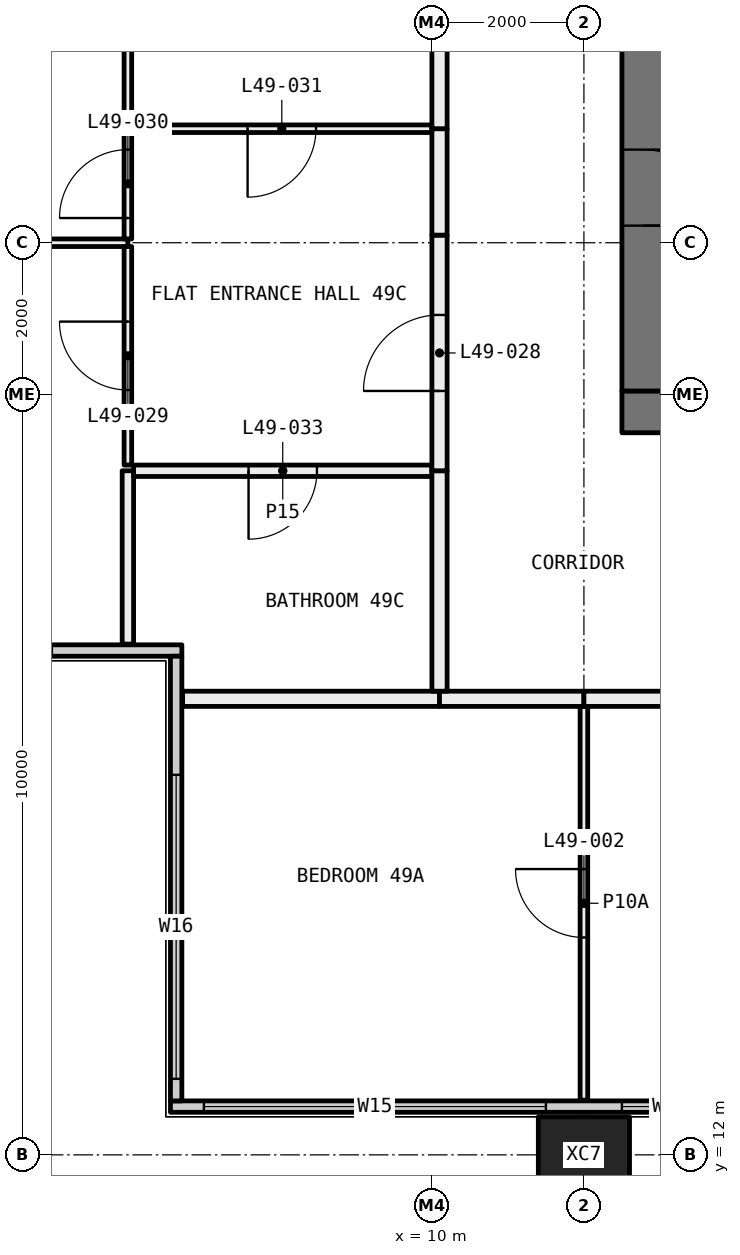
"""IFC4 building model, lengths in metres.
Left out: names, types, materials, properties, quantities, classifications, styles, units other than length and angle.
Written with IfcOpenShell. Run it as: python <this file> out.ifc"""

import sys

from ifc_helpers import new_model, si_unit, direction, frame, frame_2d, origin, origin_2d, place, context, subcontext, project, spatial, rectangle, hollow_rectangle, extrude, element, fill, save


model = new_model("IFC4")
c1 = context("Model", 3, precision=1e-05, world=origin(), true_north=direction((0.0, 1.0)))
c2 = subcontext(c1, "Body", "Model", "MODEL_VIEW")
j1 = project(units=[si_unit("LENGTHUNIT", "METRE"), si_unit("PLANEANGLEUNIT", "RADIAN")], contexts=[c1])
p1 = place(None, origin())
s1 = spatial("IfcSite", under=j1, at=p1, CompositionType="ELEMENT")
p2 = place(p1, origin())
s2 = spatial("IfcBuilding", under=s1, at=p2, CompositionType="ELEMENT")
p3 = place(p2, frame((0.0, 0.0, 185.85)))
s3 = spatial("IfcBuildingStorey", under=s2, at=p3, CompositionType="ELEMENT", Elevation=185.85)
p4 = place(p3, frame((12.0, 12.0, -0.4), z_axis=(0.0, 0.0, 1.0), x_axis=(1.0, 0.0, 0.0)))
e1 = element("IfcColumn", 1, at=p4, inside=s3, PredefinedType="COLUMN", context=c2, shape_type="SweptSolid", body=[
    extrude(hollow_rectangle(XDim=1.2, YDim=1.0, WallThickness=0.045, at=origin_2d()), origin(), (0.0, 0.0, 1.0), 3.45),
])
p5 = place(p3, frame((6.56, 12.635, 0.0), z_axis=(0.0, 0.0, 1.0), x_axis=(1.0, 0.0, 0.0)))
e2 = element("IfcWall", 2, at=p5, inside=s3, PredefinedType="ELEMENTEDWALL", context=c2, shape_type="SweptSolid", body=[
    extrude(rectangle(XDim=46.88, YDim=0.15, at=frame_2d((23.44, 0.0))), origin(), (0.0, 0.0, 1.0), 3.05),
])
p6 = place(p5, frame((0.44, 0.0, 0.45)))
e3 = element("IfcOpeningElement", 3, at=p6, cuts=e2, PredefinedType="OPENING", context=c2, shape_type="SweptSolid", body=[
    extrude(rectangle(XDim=4.5, YDim=2.55, at=frame_2d((2.25, 1.275))), frame((0.0, 0.085, 0.0), z_axis=(0.0, -1.0, 0.0), x_axis=(1.0, 0.0, 0.0)), (0.0, 0.0, 1.0), 0.17),
])
p7 = place(p5, frame((5.94, 0.0, 0.45)))
e4 = element("IfcOpeningElement", 4, at=p7, cuts=e2, PredefinedType="OPENING", context=c2, shape_type="SweptSolid", body=[
    extrude(rectangle(XDim=1.25, YDim=2.55, at=frame_2d((0.625, 1.275))), frame((0.0, 0.085, 0.0), z_axis=(0.0, -1.0, 0.0), x_axis=(1.0, 0.0, 0.0)), (0.0, 0.0, 1.0), 0.17),
])
p8 = place(p5, frame((10.19, 0.0, 0.45)))
e5 = element("IfcOpeningElement", 5, at=p8, cuts=e2, PredefinedType="OPENING", context=c2, shape_type="SweptSolid", body=[
    extrude(rectangle(XDim=0.75, YDim=2.55, at=frame_2d((0.375, 1.275))), frame((0.0, 0.085, 0.0), z_axis=(0.0, -1.0, 0.0), x_axis=(1.0, 0.0, 0.0)), (0.0, 0.0, 1.0), 0.17),
])
p9 = place(p5, frame((11.94, 0.0, 0.45)))
e6 = element("IfcOpeningElement", 6, at=p9, cuts=e2, PredefinedType="OPENING", context=c2, shape_type="SweptSolid", body=[
    extrude(rectangle(XDim=0.75, YDim=2.55, at=frame_2d((0.375, 1.275))), frame((0.0, 0.085, 0.0), z_axis=(0.0, -1.0, 0.0), x_axis=(1.0, 0.0, 0.0)), (0.0, 0.0, 1.0), 0.17),
])
p10 = place(p5, frame((15.69, 0.0, 0.45)))
e7 = element("IfcOpeningElement", 7, at=p10, cuts=e2, PredefinedType="OPENING", context=c2, shape_type="SweptSolid", body=[
    extrude(rectangle(XDim=1.25, YDim=2.55, at=frame_2d((0.625, 1.275))), frame((0.0, 0.085, 0.0), z_axis=(0.0, -1.0, 0.0), x_axis=(1.0, 0.0, 0.0)), (0.0, 0.0, 1.0), 0.17),
])
p11 = place(p5, frame((17.94, 0.0, 0.45)))
e8 = element("IfcOpeningElement", 8, at=p11, cuts=e2, PredefinedType="OPENING", context=c2, shape_type="SweptSolid", body=[
    extrude(rectangle(XDim=1.25, YDim=2.55, at=frame_2d((0.625, 1.275))), frame((0.0, 0.085, 0.0), z_axis=(0.0, -1.0, 0.0), x_axis=(1.0, 0.0, 0.0)), (0.0, 0.0, 1.0), 0.17),
])
p12 = place(p5, frame((22.19, 0.0, 0.45)))
e9 = element("IfcOpeningElement", 9, at=p12, cuts=e2, PredefinedType="OPENING", context=c2, shape_type="SweptSolid", body=[
    extrude(rectangle(XDim=0.75, YDim=2.55, at=frame_2d((0.375, 1.275))), frame((0.0, 0.085, 0.0), z_axis=(0.0, -1.0, 0.0), x_axis=(1.0, 0.0, 0.0)), (0.0, 0.0, 1.0), 0.17),
])
p13 = place(p5, frame((23.94, 0.0, 0.45)))
e10 = element("IfcOpeningElement", 10, at=p13, cuts=e2, PredefinedType="OPENING", context=c2, shape_type="SweptSolid", body=[
    extrude(rectangle(XDim=0.75, YDim=2.55, at=frame_2d((0.375, 1.275))), frame((0.0, 0.085, 0.0), z_axis=(0.0, -1.0, 0.0), x_axis=(1.0, 0.0, 0.0)), (0.0, 0.0, 1.0), 0.17),
])
p14 = place(p5, frame((27.69, 0.0, 0.45)))
e11 = element("IfcOpeningElement", 11, at=p14, cuts=e2, PredefinedType="OPENING", context=c2, shape_type="SweptSolid", body=[
    extrude(rectangle(XDim=1.25, YDim=2.55, at=frame_2d((0.625, 1.275))), frame((0.0, 0.085, 0.0), z_axis=(0.0, -1.0, 0.0), x_axis=(1.0, 0.0, 0.0)), (0.0, 0.0, 1.0), 0.17),
])
p15 = place(p5, frame((29.94, 0.0, 0.45)))
e12 = element("IfcOpeningElement", 12, at=p15, cuts=e2, PredefinedType="OPENING", context=c2, shape_type="SweptSolid", body=[
    extrude(rectangle(XDim=1.25, YDim=2.55, at=frame_2d((0.625, 1.275))), frame((0.0, 0.085, 0.0), z_axis=(0.0, -1.0, 0.0), x_axis=(1.0, 0.0, 0.0)), (0.0, 0.0, 1.0), 0.17),
])
p16 = place(p5, frame((34.19, 0.0, 0.45)))
e13 = element("IfcOpeningElement", 13, at=p16, cuts=e2, PredefinedType="OPENING", context=c2, shape_type="SweptSolid", body=[
    extrude(rectangle(XDim=0.75, YDim=2.55, at=frame_2d((0.375, 1.275))), frame((0.0, 0.085, 0.0), z_axis=(0.0, -1.0, 0.0), x_axis=(1.0, 0.0, 0.0)), (0.0, 0.0, 1.0), 0.17),
])
p17 = place(p5, frame((35.94, 0.0, 0.45)))
e14 = element("IfcOpeningElement", 14, at=p17, cuts=e2, PredefinedType="OPENING", context=c2, shape_type="SweptSolid", body=[
    extrude(rectangle(XDim=0.75, YDim=2.55, at=frame_2d((0.375, 1.275))), frame((0.0, 0.085, 0.0), z_axis=(0.0, -1.0, 0.0), x_axis=(1.0, 0.0, 0.0)), (0.0, 0.0, 1.0), 0.17),
])
p18 = place(p5, frame((39.69, 0.0, 0.45)))
e15 = element("IfcOpeningElement", 15, at=p18, cuts=e2, PredefinedType="OPENING", context=c2, shape_type="SweptSolid", body=[
    extrude(rectangle(XDim=1.25, YDim=2.55, at=frame_2d((0.625, 1.275))), frame((0.0, 0.085, 0.0), z_axis=(0.0, -1.0, 0.0), x_axis=(1.0, 0.0, 0.0)), (0.0, 0.0, 1.0), 0.17),
])
p19 = place(p5, frame((41.94, 0.0, 0.45)))
e16 = element("IfcOpeningElement", 16, at=p19, cuts=e2, PredefinedType="OPENING", context=c2, shape_type="SweptSolid", body=[
    extrude(rectangle(XDim=4.5, YDim=2.55, at=frame_2d((2.25, 1.275))), frame((0.0, 0.085, 0.0), z_axis=(0.0, -1.0, 0.0), x_axis=(1.0, 0.0, 0.0)), (0.0, 0.0, 1.0), 0.17),
])
p20 = place(p3, frame((0.56, 18.635, 0.0), z_axis=(0.0, 0.0, 1.0), x_axis=(1.0, 0.0, 0.0)))
e17 = element("IfcWall", 17, at=p20, inside=s3, PredefinedType="ELEMENTEDWALL", context=c2, shape_type="SweptSolid", body=[
    extrude(rectangle(XDim=6.15, YDim=0.15, at=frame_2d((3.075, 0.0))), origin(), (0.0, 0.0, 1.0), 3.05),
])
p21 = place(p20, frame((0.44, 0.0, 0.45)))
e18 = element("IfcOpeningElement", 18, at=p21, cuts=e17, PredefinedType="OPENING", context=c2, shape_type="SweptSolid", body=[
    extrude(rectangle(XDim=4.0, YDim=2.55, at=frame_2d((2.0, 1.275))), frame((0.0, 0.085, 0.0), z_axis=(0.0, -1.0, 0.0), x_axis=(1.0, 0.0, 0.0)), (0.0, 0.0, 1.0), 0.17),
])
p22 = place(p3, frame((6.635, 12.71, 0.0), z_axis=(0.0, 0.0, 1.0), x_axis=(0.0, 1.0, 0.0)))
e19 = element("IfcWall", 19, at=p22, inside=s3, PredefinedType="ELEMENTEDWALL", context=c2, shape_type="SweptSolid", body=[
    extrude(rectangle(XDim=5.85, YDim=0.15, at=frame_2d((2.925, 0.0))), origin(), (0.0, 0.0, 1.0), 3.05),
])
p23 = place(p22, frame((0.29, 0.0, 0.45)))
e20 = element("IfcOpeningElement", 20, at=p23, cuts=e19, PredefinedType="OPENING", context=c2, shape_type="SweptSolid", body=[
    extrude(rectangle(XDim=4.0, YDim=2.55, at=frame_2d((2.0, 1.275))), frame((0.0, 0.085, 0.0), z_axis=(0.0, -1.0, 0.0), x_axis=(1.0, 0.0, 0.0)), (0.0, 0.0, 1.0), 0.17),
])
p24 = place(p3, frame((12.0, 12.72, 0.0), z_axis=(0.0, 0.0, 1.0), x_axis=(0.0, 1.0, 0.0)))
e21 = element("IfcWall", 21, at=p24, inside=s3, PredefinedType="PARTITIONING", context=c2, shape_type="SweptSolid", body=[
    extrude(rectangle(XDim=5.18, YDim=0.1, at=frame_2d((2.59, 0.0))), origin(), (0.0, 0.0, 1.0), 3.05),
])
p25 = place(p24, frame((2.14, 0.0, 0.0)))
e22 = element("IfcOpeningElement", 22, at=p25, cuts=e21, PredefinedType="OPENING", context=c2, shape_type="SweptSolid", body=[
    extrude(rectangle(XDim=0.9, YDim=2.1, at=frame_2d((0.45, 1.05))), frame((0.0, 0.06, 0.0), z_axis=(0.0, -1.0, 0.0), x_axis=(1.0, 0.0, 0.0)), (0.0, 0.0, 1.0), 0.12),
])
p26 = place(p3, frame((10.1, 18.0, 0.0), z_axis=(0.0, 0.0, 1.0), x_axis=(-1.0, 0.0, 0.0)))
e23 = element("IfcWall", 23, at=p26, inside=s3, PredefinedType="PARTITIONING", context=c2, shape_type="SweptSolid", body=[
    extrude(rectangle(XDim=3.38, YDim=0.2, at=frame_2d((1.69, 0.0))), origin(), (0.0, 0.0, 1.0), 3.05),
])
p27 = place(p3, frame((12.0, 18.0, 0.0), z_axis=(0.0, 0.0, 1.0), x_axis=(-1.0, 0.0, 0.0)))
e24 = element("IfcWall", 24, at=p27, inside=s3, PredefinedType="PARTITIONING", context=c2, shape_type="SweptSolid", body=[
    extrude(rectangle(XDim=1.9, YDim=0.2, at=frame_2d((0.95, 0.0))), origin(), (0.0, 0.0, 1.0), 3.05),
])
p28 = place(p3, frame((18.0, 18.0, 0.0), z_axis=(0.0, 0.0, 1.0), x_axis=(-1.0, 0.0, 0.0)))
e25 = element("IfcWall", 25, at=p28, inside=s3, PredefinedType="PARTITIONING", context=c2, shape_type="SweptSolid", body=[
    extrude(rectangle(XDim=6.0, YDim=0.2, at=frame_2d((3.0, 0.0))), origin(), (0.0, 0.0, 1.0), 3.05),
])
p29 = place(p28, frame((2.5, 0.0, 0.0)))
e26 = element("IfcOpeningElement", 26, at=p29, cuts=e25, PredefinedType="OPENING", context=c2, shape_type="SweptSolid", body=[
    extrude(rectangle(XDim=1.0, YDim=2.1, at=frame_2d((0.5, 1.05))), frame((0.0, 0.11, 0.0), z_axis=(0.0, -1.0, 0.0), x_axis=(1.0, 0.0, 0.0)), (0.0, 0.0, 1.0), 0.22),
])
p30 = place(p3, frame((6.0, 24.0, 0.0), z_axis=(0.0, 0.0, 1.0), x_axis=(-1.0, 0.0, 0.0)))
e27 = element("IfcWall", 27, at=p30, inside=s3, PredefinedType="PARTITIONING", context=c2, shape_type="SweptSolid", body=[
    extrude(rectangle(XDim=5.28, YDim=0.1, at=frame_2d((2.64, 0.0))), origin(), (0.0, 0.0, 1.0), 2.45),
])
p31 = place(p3, frame((6.0, 18.72, 0.0), z_axis=(0.0, 0.0, 1.0), x_axis=(0.0, 1.0, 0.0)))
e28 = element("IfcWall", 28, at=p31, inside=s3, PredefinedType="PARTITIONING", context=c2, shape_type="SweptSolid", body=[
    extrude(rectangle(XDim=2.28, YDim=0.15, at=frame_2d((1.14, 0.0))), origin(), (0.0, 0.0, 1.0), 3.05),
])
p32 = place(p3, frame((6.0, 21.075, 0.0), z_axis=(0.0, 0.0, 1.0), x_axis=(0.0, 1.0, 0.0)))
e29 = element("IfcWall", 29, at=p32, inside=s3, PredefinedType="PARTITIONING", context=c2, shape_type="SweptSolid", body=[
    extrude(rectangle(XDim=2.875, YDim=0.1, at=frame_2d((1.438, 0.0))), origin(), (0.0, 0.0, 1.0), 2.45),
])
p33 = place(p32, frame((0.988, 0.0, 0.0)))
e30 = element("IfcOpeningElement", 30, at=p33, cuts=e29, PredefinedType="OPENING", context=c2, shape_type="SweptSolid", body=[
    extrude(rectangle(XDim=0.9, YDim=2.1, at=frame_2d((0.45, 1.05))), frame((0.0, 0.06, 0.0), z_axis=(0.0, -1.0, 0.0), x_axis=(1.0, 0.0, 0.0)), (0.0, 0.0, 1.0), 0.12),
])
p34 = place(p3, frame((6.0, 24.05, 0.0), z_axis=(0.0, 0.0, 1.0), x_axis=(0.0, 1.0, 0.0)))
e31 = element("IfcWall", 31, at=p34, inside=s3, PredefinedType="PARTITIONING", context=c2, shape_type="SweptSolid", body=[
    extrude(rectangle(XDim=1.45, YDim=0.1, at=frame_2d((0.725, 0.0))), origin(), (0.0, 0.0, 1.0), 2.45),
])
p35 = place(p34, frame((0.275, 0.0, 0.0)))
e32 = element("IfcOpeningElement", 32, at=p35, cuts=e31, PredefinedType="OPENING", context=c2, shape_type="SweptSolid", body=[
    extrude(rectangle(XDim=0.9, YDim=2.1, at=frame_2d((0.45, 1.05))), frame((0.0, 0.06, 0.0), z_axis=(0.0, -1.0, 0.0), x_axis=(1.0, 0.0, 0.0)), (0.0, 0.0, 1.0), 0.12),
])
p36 = place(p3, frame((6.0, 25.5, 0.0), z_axis=(0.0, 0.0, 1.0), x_axis=(0.0, 1.0, 0.0)))
e33 = element("IfcWall", 33, at=p36, inside=s3, PredefinedType="PARTITIONING", context=c2, shape_type="SweptSolid", body=[
    extrude(rectangle(XDim=10.45, YDim=0.1, at=frame_2d((5.225, 0.0))), origin(), (0.0, 0.0, 1.0), 2.45),
])
p37 = place(p3, frame((10.0, 21.0, 0.0), z_axis=(0.0, 0.0, 1.0), x_axis=(-1.0, 0.0, 0.0)))
e34 = element("IfcWall", 34, at=p37, inside=s3, PredefinedType="PARTITIONING", context=c2, shape_type="SweptSolid", body=[
    extrude(rectangle(XDim=3.925, YDim=0.15, at=frame_2d((1.962, 0.0))), origin(), (0.0, 0.0, 1.0), 3.05),
])
p38 = place(p37, frame((1.512, 0.0, 0.0)))
e35 = element("IfcOpeningElement", 35, at=p38, cuts=e34, PredefinedType="OPENING", context=c2, shape_type="SweptSolid", body=[
    extrude(rectangle(XDim=0.9, YDim=2.1, at=frame_2d((0.45, 1.05))), frame((0.0, 0.085, 0.0), z_axis=(0.0, -1.0, 0.0), x_axis=(1.0, 0.0, 0.0)), (0.0, 0.0, 1.0), 0.17),
])
p39 = place(p3, frame((10.1, 18.1, 0.0), z_axis=(0.0, 0.0, 1.0), x_axis=(0.0, 1.0, 0.0)))
e36 = element("IfcWall", 36, at=p39, inside=s3, PredefinedType="PARTITIONING", context=c2, shape_type="SweptSolid", body=[
    extrude(rectangle(XDim=2.9, YDim=0.2, at=frame_2d((1.45, 0.0))), origin(), (0.0, 0.0, 1.0), 3.05),
])
p40 = place(p3, frame((10.0, 25.5, 0.0), z_axis=(0.0, 0.0, 1.0), x_axis=(-1.0, 0.0, 0.0)))
e37 = element("IfcWall", 37, at=p40, inside=s3, PredefinedType="PARTITIONING", context=c2, shape_type="SweptSolid", body=[
    extrude(rectangle(XDim=3.95, YDim=0.1, at=frame_2d((1.975, 0.0))), origin(), (0.0, 0.0, 1.0), 3.05),
])
p41 = place(p40, frame((1.525, 0.0, 0.0)))
e38 = element("IfcOpeningElement", 38, at=p41, cuts=e37, PredefinedType="OPENING", context=c2, shape_type="SweptSolid", body=[
    extrude(rectangle(XDim=0.9, YDim=2.1, at=frame_2d((0.45, 1.05))), frame((0.0, 0.06, 0.0), z_axis=(0.0, -1.0, 0.0), x_axis=(1.0, 0.0, 0.0)), (0.0, 0.0, 1.0), 0.12),
])
p42 = place(p3, frame((10.1, 21.0, 0.0), z_axis=(0.0, 0.0, 1.0), x_axis=(0.0, 1.0, 0.0)))
e39 = element("IfcWall", 39, at=p42, inside=s3, PredefinedType="PARTITIONING", context=c2, shape_type="SweptSolid", body=[
    extrude(rectangle(XDim=3.1, YDim=0.2, at=frame_2d((1.55, 0.0))), origin(), (0.0, 0.0, 1.0), 2.45),
])
p43 = place(p42, frame((1.05, 0.0, 0.0)))
e40 = element("IfcOpeningElement", 40, at=p43, cuts=e39, PredefinedType="OPENING", context=c2, shape_type="SweptSolid", body=[
    extrude(rectangle(XDim=1.0, YDim=2.1, at=frame_2d((0.5, 1.05))), frame((0.0, 0.11, 0.0), z_axis=(0.0, -1.0, 0.0), x_axis=(1.0, 0.0, 0.0)), (0.0, 0.0, 1.0), 0.22),
])
p44 = place(p3, frame((10.1, 24.1, 0.0), z_axis=(0.0, 0.0, 1.0), x_axis=(0.0, 1.0, 0.0)))
e41 = element("IfcWall", 41, at=p44, inside=s3, PredefinedType="PARTITIONING", context=c2, shape_type="SweptSolid", body=[
    extrude(rectangle(XDim=1.4, YDim=0.2, at=frame_2d((0.7, 0.0))), origin(), (0.0, 0.0, 1.0), 3.05),
])
p45 = place(p3, frame((10.1, 25.5, 0.0), z_axis=(0.0, 0.0, 1.0), x_axis=(0.0, 1.0, 0.0)))
e42 = element("IfcWall", 42, at=p45, inside=s3, PredefinedType="PARTITIONING", context=c2, shape_type="SweptSolid", body=[
    extrude(rectangle(XDim=10.6, YDim=0.2, at=frame_2d((5.3, 0.0))), origin(), (0.0, 0.0, 1.0), 2.45),
])
p46 = place(p3, frame((12.5, 21.775, 0.0), z_axis=(0.0, 0.0, 1.0), x_axis=(1.0, 0.0, 0.0)))
e43 = element("IfcWall", 43, at=p46, inside=s3, PredefinedType="SHEAR", context=c2, shape_type="SweptSolid", body=[
    extrude(rectangle(XDim=11.0, YDim=0.55, at=frame_2d((5.5, 0.0))), origin(), (0.0, 0.0, 1.0), 3.05),
])
p47 = place(p3, frame((12.775, 22.05, 0.0), z_axis=(0.0, 0.0, 1.0), x_axis=(0.0, 1.0, 0.0)))
e44 = element("IfcWall", 44, at=p47, inside=s3, PredefinedType="SHEAR", context=c2, shape_type="SweptSolid", body=[
    extrude(rectangle(XDim=15.9, YDim=0.55, at=frame_2d((7.95, 0.0))), origin(), (0.0, 0.0, 1.0), 3.05),
])
p48 = place(p47, frame((8.4, 0.0, 0.0)))
e45 = element("IfcOpeningElement", 45, at=p48, cuts=e44, PredefinedType="OPENING", context=c2, shape_type="SweptSolid", body=[
    extrude(rectangle(XDim=1.6, YDim=2.1, at=frame_2d((0.8, 1.05))), frame((0.0, 0.285, 0.0), z_axis=(0.0, -1.0, 0.0), x_axis=(1.0, 0.0, 0.0)), (0.0, 0.0, 1.0), 0.57),
])
p49 = place(p47, frame((2.175, 0.0, 0.0)))
e46 = element("IfcOpeningElement", 46, at=p49, cuts=e44, PredefinedType="OPENING", context=c2, shape_type="SweptSolid", body=[
    extrude(rectangle(XDim=1.0, YDim=2.1, at=frame_2d((0.5, 1.05))), frame((0.0, 0.285, 0.0), z_axis=(0.0, -1.0, 0.0), x_axis=(1.0, 0.0, 0.0)), (0.0, 0.0, 1.0), 0.57),
])
p50 = place(p6, origin())
e47 = element("IfcWindow", 47, at=p50, inside=s3, PartitioningType="SINGLE_PANEL", PredefinedType="WINDOW", context=c2, shape_type="SweptSolid", body=[
    extrude(rectangle(XDim=4.5, YDim=2.55, at=frame_2d((2.25, 1.275))), frame((0.0, 0.03, 0.0), z_axis=(0.0, -1.0, 0.0), x_axis=(1.0, 0.0, 0.0)), (0.0, 0.0, 1.0), 0.06),
])
fill(e3, e47)
p51 = place(p7, origin())
e48 = element("IfcWindow", 48, at=p51, inside=s3, PartitioningType="SINGLE_PANEL", PredefinedType="WINDOW", context=c2, shape_type="SweptSolid", body=[
    extrude(rectangle(XDim=1.25, YDim=2.55, at=frame_2d((0.625, 1.275))), frame((0.0, 0.03, 0.0), z_axis=(0.0, -1.0, 0.0), x_axis=(1.0, 0.0, 0.0)), (0.0, 0.0, 1.0), 0.06),
])
fill(e4, e48)
p52 = place(p23, origin())
e49 = element("IfcWindow", 49, at=p52, inside=s3, PartitioningType="SINGLE_PANEL", PredefinedType="WINDOW", context=c2, shape_type="SweptSolid", body=[
    extrude(rectangle(XDim=4.0, YDim=2.55, at=frame_2d((2.0, 1.275))), frame((0.0, 0.03, 0.0), z_axis=(0.0, -1.0, 0.0), x_axis=(1.0, 0.0, 0.0)), (0.0, 0.0, 1.0), 0.06),
])
fill(e20, e49)
p53 = place(p25, origin())
e50 = element("IfcDoor", 50, at=p53, inside=s3, OperationType="SINGLE_SWING_LEFT", PredefinedType="DOOR", context=c2, shape_type="SweptSolid", body=[
    extrude(rectangle(XDim=0.9, YDim=2.1, at=frame_2d((0.45, 1.05))), frame((0.0, 0.025, 0.0), z_axis=(0.0, -1.0, 0.0), x_axis=(1.0, 0.0, 0.0)), (0.0, 0.0, 1.0), 0.05),
])
fill(e22, e50)
p54 = place(p43, origin())
e51 = element("IfcDoor", 51, at=p54, inside=s3, OperationType="SINGLE_SWING_RIGHT", PredefinedType="DOOR", context=c2, shape_type="SweptSolid", body=[
    extrude(rectangle(XDim=1.0, YDim=2.1, at=frame_2d((0.5, 1.05))), frame((0.0, 0.025, 0.0), z_axis=(0.0, -1.0, 0.0), x_axis=(1.0, 0.0, 0.0)), (0.0, 0.0, 1.0), 0.05),
])
fill(e40, e51)
p55 = place(p33, origin())
e52 = element("IfcDoor", 52, at=p55, inside=s3, OperationType="SINGLE_SWING_LEFT", PredefinedType="DOOR", context=c2, shape_type="SweptSolid", body=[
    extrude(rectangle(XDim=0.9, YDim=2.1, at=frame_2d((0.45, 1.05))), frame((0.0, 0.025, 0.0), z_axis=(0.0, -1.0, 0.0), x_axis=(1.0, 0.0, 0.0)), (0.0, 0.0, 1.0), 0.05),
])
fill(e30, e52)
p56 = place(p35, origin())
e53 = element("IfcDoor", 53, at=p56, inside=s3, OperationType="SINGLE_SWING_RIGHT", PredefinedType="DOOR", context=c2, shape_type="SweptSolid", body=[
    extrude(rectangle(XDim=0.9, YDim=2.1, at=frame_2d((0.45, 1.05))), frame((0.0, 0.025, 0.0), z_axis=(0.0, -1.0, 0.0), x_axis=(1.0, 0.0, 0.0)), (0.0, 0.0, 1.0), 0.05),
])
fill(e32, e53)
p57 = place(p41, origin())
e54 = element("IfcDoor", 54, at=p57, inside=s3, OperationType="SINGLE_SWING_LEFT", PredefinedType="DOOR", context=c2, shape_type="SweptSolid", body=[
    extrude(rectangle(XDim=0.9, YDim=2.1, at=frame_2d((0.45, 1.05))), frame((0.0, 0.025, 0.0), z_axis=(0.0, -1.0, 0.0), x_axis=(1.0, 0.0, 0.0)), (0.0, 0.0, 1.0), 0.05),
])
fill(e38, e54)
p58 = place(p38, origin())
e55 = element("IfcDoor", 55, at=p58, inside=s3, OperationType="SINGLE_SWING_LEFT", PredefinedType="DOOR", context=c2, shape_type="SweptSolid", body=[
    extrude(rectangle(XDim=0.9, YDim=2.1, at=frame_2d((0.45, 1.05))), frame((0.0, 0.025, 0.0), z_axis=(0.0, -1.0, 0.0), x_axis=(1.0, 0.0, 0.0)), (0.0, 0.0, 1.0), 0.05),
])
fill(e35, e55)
p59 = place(p49, frame((1.0, 0.0, 0.0), x_axis=(-1.0, 0.0, 0.0)))
e56 = element("IfcDoor", 56, at=p59, inside=s3, OperationType="SINGLE_SWING_LEFT", PredefinedType="DOOR", context=c2, shape_type="SweptSolid", body=[
    extrude(rectangle(XDim=1.0, YDim=2.1, at=frame_2d((0.5, 1.05))), frame((0.0, 0.025, 0.0), z_axis=(0.0, -1.0, 0.0), x_axis=(1.0, 0.0, 0.0)), (0.0, 0.0, 1.0), 0.05),
])
fill(e46, e56)
save(model, sys.argv[1])
